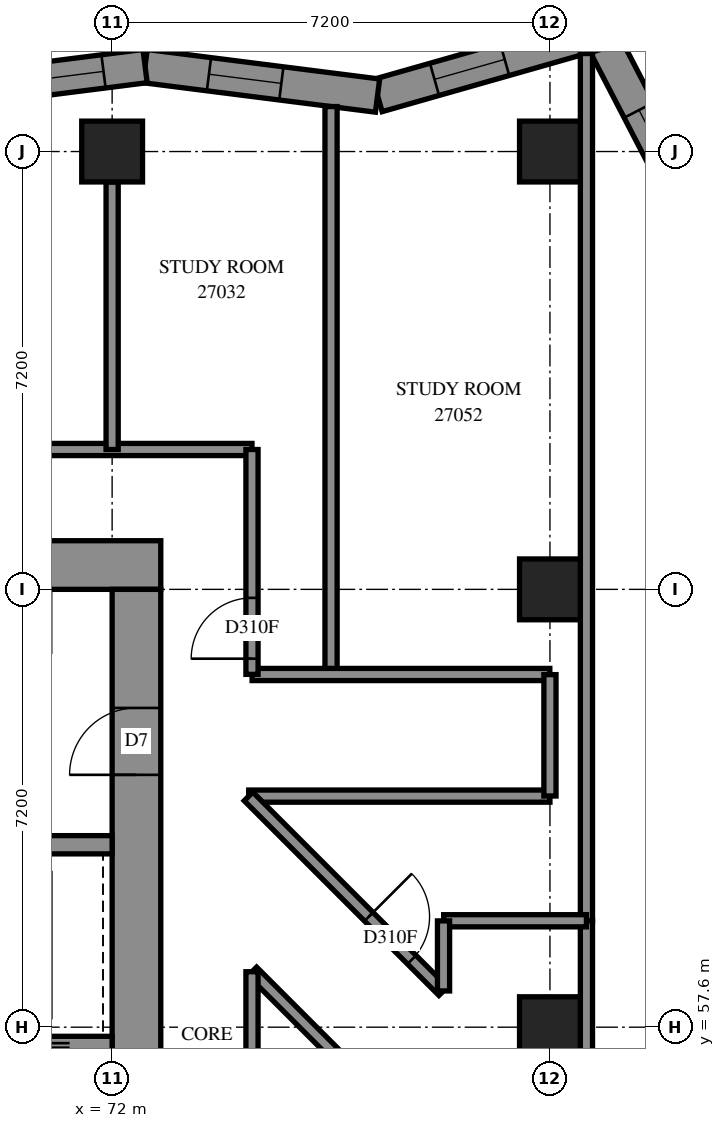
"""IFC4 building model, lengths in metres.
Left out: names, types, materials, properties, quantities, classifications, styles, units other than length and angle.
Written with IfcOpenShell. Run it as: python <this file> out.ifc"""

import sys

from ifc_helpers import new_model, si_unit, direction, frame, frame_2d, origin, origin_2d, place, context, subcontext, project, spatial, polyline, rectangle, outline, extrude, element, fill, save


model = new_model("IFC4")
c1 = context("Model", 3, precision=1e-05, world=origin(), true_north=direction((0.0, 1.0)))
c2 = subcontext(c1, "Body", "Model", "MODEL_VIEW")
j1 = project(units=[si_unit("LENGTHUNIT", "METRE"), si_unit("PLANEANGLEUNIT", "RADIAN")], contexts=[c1])
p1 = place(None, origin())
s1 = spatial("IfcSite", under=j1, at=p1, CompositionType="ELEMENT")
p2 = place(p1, origin())
s2 = spatial("IfcBuilding", under=s1, at=p2, CompositionType="ELEMENT")
p3 = place(p2, frame((0.0, 0.0, 101.6)))
s3 = spatial("IfcBuildingStorey", under=s2, at=p3, CompositionType="ELEMENT", Elevation=101.6)
for number, where, z_axis, x_axis in (
    (1, (72.0, 72.0, 0.0), (0.0, 0.0, 1.0), (1.0, 0.0, 0.0)),
    (2, (79.2, 57.6, 0.0), (0.0, 0.0, 1.0), (1.0, 0.0, 0.0)),
    (3, (79.2, 64.8, 0.0), (0.0, 0.0, 1.0), (1.0, 0.0, 0.0)),
    (4, (79.2, 72.0, 0.0), (0.0, 0.0, 1.0), (1.0, 0.0, 0.0)),
):
    element("IfcColumn", number, at=place(p3, frame(where, z_axis=z_axis, x_axis=x_axis)), inside=s3, PredefinedType="COLUMN", context=c2, shape_type="SweptSolid", body=[
        extrude(rectangle(XDim=1.0, YDim=1.0, at=origin_2d()), origin(), (0.0, 0.0, 1.0), 3.1),
    ])
p4 = place(p3, frame((56.8, 65.2, -0.3), z_axis=(0.0, 0.0, 1.0), x_axis=(1.0, 0.0, 0.0)))
e5 = element("IfcWall", 5, at=p4, inside=s3, PredefinedType="SHEAR", context=c2, shape_type="SweptSolid", body=[
    extrude(rectangle(XDim=16.0, YDim=0.8, at=frame_2d((8.0, 0.0))), origin(), (0.0, 0.0, 1.0), 2.7),
])
p5 = place(p4, frame((10.8, 0.0, 0.3)))
e6 = element("IfcOpeningElement", 6, at=p5, cuts=e5, PredefinedType="OPENING", context=c2, shape_type="SweptSolid", body=[
    extrude(rectangle(XDim=0.8, YDim=2.1, at=frame_2d((0.4, 1.05))), frame((0.0, 0.41, 0.0), z_axis=(0.0, -1.0, 0.0), x_axis=(1.0, 0.0, 0.0)), (0.0, 0.0, 1.0), 0.82),
])
p6 = place(p3, frame((72.4, 50.4, -0.3), z_axis=(0.0, 0.0, 1.0), x_axis=(0.0, 1.0, 0.0)))
e7 = element("IfcWall", 7, at=p6, inside=s3, PredefinedType="SHEAR", context=c2, shape_type="SweptSolid", body=[
    extrude(rectangle(XDim=14.4, YDim=0.8, at=frame_2d((7.2, 0.0))), origin(), (0.0, 0.0, 1.0), 2.7),
])
p7 = place(p6, frame((4.55, 0.0, 0.3)))
e8 = element("IfcOpeningElement", 8, at=p7, cuts=e7, PredefinedType="OPENING", context=c2, shape_type="SweptSolid", body=[
    extrude(rectangle(XDim=1.1, YDim=2.1, at=frame_2d((0.55, 1.05))), frame((0.0, 0.41, 0.0), z_axis=(0.0, -1.0, 0.0), x_axis=(1.0, 0.0, 0.0)), (0.0, 0.0, 1.0), 0.82),
])
p8 = place(p6, frame((11.35, 0.0, 0.3)))
e9 = element("IfcOpeningElement", 9, at=p8, cuts=e7, PredefinedType="OPENING", context=c2, shape_type="SweptSolid", body=[
    extrude(rectangle(XDim=1.1, YDim=2.1, at=frame_2d((0.55, 1.05))), frame((0.0, 0.41, 0.0), z_axis=(0.0, -1.0, 0.0), x_axis=(1.0, 0.0, 0.0)), (0.0, 0.0, 1.0), 0.82),
])
p9 = place(p3, frame((57.6, 57.3, 0.0), z_axis=(0.0, 0.0, 1.0), x_axis=(1.0, 0.0, 0.0)))
e10 = element("IfcWall", 10, at=p9, inside=s3, PredefinedType="SOLIDWALL", context=c2, shape_type="SweptSolid", body=[
    extrude(rectangle(XDim=14.4, YDim=0.3, at=frame_2d((7.2, 0.0))), origin(), (0.0, 0.0, 1.0), 3.1),
])
p10 = place(p9, frame((12.05, 0.0, 0.0)))
e11 = element("IfcOpeningElement", 11, at=p10, cuts=e10, PredefinedType="OPENING", context=c2, shape_type="SweptSolid", body=[
    extrude(rectangle(XDim=1.1, YDim=2.1, at=frame_2d((0.55, 1.05))), frame((0.0, 0.16, 0.0), z_axis=(0.0, -1.0, 0.0), x_axis=(1.0, 0.0, 0.0)), (0.0, 0.0, 1.0), 0.32),
])
p11 = place(p3, frame((64.8, 60.6, 0.0), z_axis=(0.0, 0.0, 1.0), x_axis=(1.0, 0.0, 0.0)))
e12 = element("IfcWall", 12, at=p11, inside=s3, PredefinedType="SOLIDWALL", context=c2, shape_type="SweptSolid", body=[
    extrude(rectangle(XDim=7.2, YDim=0.3, at=frame_2d((3.6, 0.0))), origin(), (0.0, 0.0, 1.0), 3.1),
])
p12 = place(p3, frame((76.372, 49.373, -0.3), z_axis=(0.0, 0.0, 1.0), x_axis=(0.7071067812, 0.7071067812, 0.0)))
e13 = element("IfcWall", 13, at=p12, inside=s3, PredefinedType="SHEAR", context=c2, shape_type="SweptSolid", body=[
    extrude(rectangle(XDim=14.4, YDim=0.8, at=frame_2d((7.2, 0.0))), origin(), (0.0, 0.0, 1.0), 2.7),
])
p13 = place(p12, frame((4.55, 0.0, 0.3)))
e14 = element("IfcOpeningElement", 14, at=p13, cuts=e13, PredefinedType="OPENING", context=c2, shape_type="SweptSolid", body=[
    extrude(rectangle(XDim=1.1, YDim=2.1, at=frame_2d((0.55, 1.05))), frame((0.0, 0.41, 0.0), z_axis=(0.0, -1.0, 0.0), x_axis=(1.0, 0.0, 0.0)), (0.0, 0.0, 1.0), 0.82),
])
p14 = place(p12, frame((11.35, 0.0, 0.3)))
e15 = element("IfcOpeningElement", 15, at=p14, cuts=e13, PredefinedType="OPENING", context=c2, shape_type="SweptSolid", body=[
    extrude(rectangle(XDim=1.1, YDim=2.1, at=frame_2d((0.55, 1.05))), frame((0.0, 0.41, 0.0), z_axis=(0.0, -1.0, 0.0), x_axis=(1.0, 0.0, 0.0)), (0.0, 0.0, 1.0), 0.82),
])
p15 = place(p3, frame((81.576, 70.923, 0.0), z_axis=(0.0, 0.0, 1.0), x_axis=(-0.4601530869, 0.8878395895, 0.0)))
e16 = element("IfcWall", 16, at=p15, inside=s3, PredefinedType="SOLIDWALL", context=c2, shape_type="SweptSolid", body=[
    extrude(outline(polyline([(0.063, -0.275), (3.64, -0.275), (3.191, 0.275), (-0.063, 0.275), (0.063, -0.275)])), origin(), (0.0, 0.0, 1.0), 3.1),
])
p16 = place(p15, frame((0.781, 0.0, 0.5)))
e17 = element("IfcOpeningElement", 17, at=p16, cuts=e16, PredefinedType="OPENING", context=c2, shape_type="SweptSolid", body=[
    extrude(rectangle(XDim=1.2, YDim=2.45, at=frame_2d((0.6, 1.225))), frame((0.0, 0.285, 0.0), z_axis=(0.0, -1.0, 0.0), x_axis=(1.0, 0.0, 0.0)), (0.0, 0.0, 1.0), 0.57),
])
p17 = place(p3, frame((80.004, 73.956, 0.0), z_axis=(0.0, 0.0, 1.0), x_axis=(-0.961803656, -0.2737402553, 0.0)))
e18 = element("IfcWall", 18, at=p17, inside=s3, PredefinedType="SOLIDWALL", context=c2, shape_type="SweptSolid", body=[
    extrude(outline(polyline([(-0.225, -0.275), (3.728, -0.275), (3.841, 0.275), (0.225, 0.275), (-0.225, -0.275)])), origin(), (0.0, 0.0, 1.0), 3.1),
])
p18 = place(p17, frame((1.61, 0.0, 0.5)))
e19 = element("IfcOpeningElement", 19, at=p18, cuts=e18, PredefinedType="OPENING", context=c2, shape_type="SweptSolid", body=[
    extrude(rectangle(XDim=1.2, YDim=2.45, at=frame_2d((0.6, 1.225))), frame((0.0, 0.285, 0.0), z_axis=(0.0, -1.0, 0.0), x_axis=(1.0, 0.0, 0.0)), (0.0, 0.0, 1.0), 0.57),
])
p19 = place(p3, frame((76.365, 72.92, 0.0), z_axis=(0.0, 0.0, 1.0), x_axis=(-0.9920579561, 0.1257816033, 0.0)))
e20 = element("IfcWall", 20, at=p19, inside=s3, PredefinedType="SOLIDWALL", context=c2, shape_type="SweptSolid", body=[
    extrude(outline(polyline([(0.056, -0.275), (3.888, -0.275), (3.819, 0.275), (-0.056, 0.275), (0.056, -0.275)])), origin(), (0.0, 0.0, 1.0), 3.1),
])
p20 = place(p19, frame((1.595, 0.0, 0.5)))
e21 = element("IfcOpeningElement", 21, at=p20, cuts=e20, PredefinedType="OPENING", context=c2, shape_type="SweptSolid", body=[
    extrude(rectangle(XDim=1.2, YDim=2.45, at=frame_2d((0.6, 1.225))), frame((0.0, 0.285, 0.0), z_axis=(0.0, -1.0, 0.0), x_axis=(1.0, 0.0, 0.0)), (0.0, 0.0, 1.0), 0.57),
])
p21 = place(p3, frame((72.542, 73.405, 0.0), z_axis=(0.0, 0.0, 1.0), x_axis=(-0.9920583495, -0.1257785003, 0.0)))
e22 = element("IfcWall", 22, at=p21, inside=s3, PredefinedType="SOLIDWALL", context=c2, shape_type="SweptSolid", body=[
    extrude(outline(polyline([(-0.035, -0.275), (3.797, -0.275), (3.867, 0.275), (0.035, 0.275), (-0.035, -0.275)])), origin(), (0.0, 0.0, 1.0), 3.1),
])
p22 = place(p21, frame((0.689, 0.0, 0.5)))
e23 = element("IfcOpeningElement", 23, at=p22, cuts=e22, PredefinedType="OPENING", context=c2, shape_type="SweptSolid", body=[
    extrude(rectangle(XDim=1.3, YDim=2.45, at=frame_2d((0.65, 1.225))), frame((0.0, 0.285, 0.0), z_axis=(0.0, -1.0, 0.0), x_axis=(1.0, 0.0, 0.0)), (0.0, 0.0, 1.0), 0.57),
])
p23 = place(p21, frame((2.189, 0.0, 0.5)))
e24 = element("IfcOpeningElement", 24, at=p23, cuts=e22, PredefinedType="OPENING", context=c2, shape_type="SweptSolid", body=[
    extrude(rectangle(XDim=1.3, YDim=2.45, at=frame_2d((0.65, 1.225))), frame((0.0, 0.285, 0.0), z_axis=(0.0, -1.0, 0.0), x_axis=(1.0, 0.0, 0.0)), (0.0, 0.0, 1.0), 0.57),
])
p24 = place(p3, frame((55.3, 67.1, 0.0), z_axis=(0.0, 0.0, 1.0), x_axis=(1.0, 0.0, 0.0)))
e25 = element("IfcWall", 25, at=p24, inside=s3, PredefinedType="PARTITIONING", context=c2, shape_type="SweptSolid", body=[
    extrude(rectangle(XDim=19.0, YDim=0.2, at=frame_2d((9.5, 0.0))), origin(), (0.0, 0.0, 1.0), 3.1),
])
p25 = place(p24, frame((6.199, 0.0, 0.0)))
e26 = element("IfcOpeningElement", 26, at=p25, cuts=e25, PredefinedType="OPENING", context=c2, shape_type="SweptSolid", body=[
    extrude(rectangle(XDim=0.9, YDim=2.1, at=frame_2d((0.45, 1.05))), frame((0.0, 0.11, 0.0), z_axis=(0.0, -1.0, 0.0), x_axis=(1.0, 0.0, 0.0)), (0.0, 0.0, 1.0), 0.22),
])
p26 = place(p24, frame((13.399, 0.0, 0.0)))
e27 = element("IfcOpeningElement", 27, at=p26, cuts=e25, PredefinedType="OPENING", context=c2, shape_type="SweptSolid", body=[
    extrude(rectangle(XDim=0.9, YDim=2.1, at=frame_2d((0.45, 1.05))), frame((0.0, 0.11, 0.0), z_axis=(0.0, -1.0, 0.0), x_axis=(1.0, 0.0, 0.0)), (0.0, 0.0, 1.0), 0.22),
])
p27 = place(p3, frame((79.8, 59.35, 0.0), z_axis=(0.0, 0.0, 1.0), x_axis=(0.0, 1.0, 0.0)))
e28 = element("IfcWall", 28, at=p27, inside=s3, PredefinedType="PARTITIONING", context=c2, shape_type="SweptSolid", body=[
    extrude(rectangle(XDim=14.262, YDim=0.2, at=frame_2d((7.131, 0.0))), origin(), (0.0, 0.0, 1.0), 3.1),
])
p28 = place(p3, frame((75.6, 63.4, 0.0), z_axis=(0.0, 0.0, 1.0), x_axis=(0.0, 1.0, 0.0)))
e29 = element("IfcWall", 29, at=p28, inside=s3, PredefinedType="PARTITIONING", context=c2, shape_type="SweptSolid", body=[
    extrude(rectangle(XDim=9.34, YDim=0.2, at=frame_2d((4.67, 0.0))), origin(), (0.0, 0.0, 1.0), 3.1),
])
p29 = place(p3, frame((74.246, 61.4, 0.0), z_axis=(0.0, 0.0, 1.0), x_axis=(1.0, 0.0, 0.0)))
e30 = element("IfcWall", 30, at=p29, inside=s3, PredefinedType="PARTITIONING", context=c2, shape_type="SweptSolid", body=[
    extrude(rectangle(XDim=4.954, YDim=0.2, at=frame_2d((2.477, 0.0))), origin(), (0.0, 0.0, 1.0), 3.1),
])
p30 = place(p3, frame((74.302, 63.4, 0.0), z_axis=(0.0, 0.0, 1.0), x_axis=(1.0, 0.0, 0.0)))
e31 = element("IfcWall", 31, at=p30, inside=s3, PredefinedType="PARTITIONING", context=c2, shape_type="SweptSolid", body=[
    extrude(rectangle(XDim=4.896, YDim=0.2, at=frame_2d((2.448, 0.0))), origin(), (0.0, 0.0, 1.0), 3.1),
])
p31 = place(p3, frame((74.243, 61.395, 0.0), z_axis=(0.0, 0.0, 1.0), x_axis=(0.7071067812, -0.7071067812, 0.0)))
e32 = element("IfcWall", 32, at=p31, inside=s3, PredefinedType="PARTITIONING", context=c2, shape_type="SweptSolid", body=[
    extrude(rectangle(XDim=4.528, YDim=0.2, at=frame_2d((2.264, 0.0))), origin(), (0.0, 0.0, 1.0), 3.1),
])
p32 = place(p31, frame((2.797, 0.0, 0.0)))
e33 = element("IfcOpeningElement", 33, at=p32, cuts=e32, PredefinedType="OPENING", context=c2, shape_type="SweptSolid", body=[
    extrude(rectangle(XDim=1.0, YDim=2.1, at=frame_2d((0.5, 1.05))), frame((0.0, 0.11, 0.0), z_axis=(0.0, -1.0, 0.0), x_axis=(1.0, 0.0, 0.0)), (0.0, 0.0, 1.0), 0.22),
])
p33 = place(p3, frame((72.0, 67.1, 0.0), z_axis=(0.0, 0.0, 1.0), x_axis=(0.0, 1.0, 0.0)))
e34 = element("IfcWall", 34, at=p33, inside=s3, PredefinedType="PARTITIONING", context=c2, shape_type="SweptSolid", body=[
    extrude(rectangle(XDim=4.4, YDim=0.2, at=frame_2d((2.2, 0.0))), origin(), (0.0, 0.0, 1.0), 3.1),
])
p34 = place(p3, frame((74.3, 63.402, 0.0), z_axis=(0.0, 0.0, 1.0), x_axis=(0.0, 1.0, 0.0)))
e35 = element("IfcWall", 35, at=p34, inside=s3, PredefinedType="PARTITIONING", context=c2, shape_type="SweptSolid", body=[
    extrude(rectangle(XDim=3.698, YDim=0.2, at=frame_2d((1.849, 0.0))), origin(), (0.0, 0.0, 1.0), 3.1),
])
p35 = place(p34, frame((0.258, 0.0, 0.0)))
e36 = element("IfcOpeningElement", 36, at=p35, cuts=e35, PredefinedType="OPENING", context=c2, shape_type="SweptSolid", body=[
    extrude(rectangle(XDim=1.0, YDim=2.1, at=frame_2d((0.5, 1.05))), frame((0.0, 0.11, 0.0), z_axis=(0.0, -1.0, 0.0), x_axis=(1.0, 0.0, 0.0)), (0.0, 0.0, 1.0), 0.22),
])
p36 = place(p3, frame((79.8, 55.85, 0.0), z_axis=(0.0, 0.0, 1.0), x_axis=(0.0, 1.0, 0.0)))
e37 = element("IfcWall", 37, at=p36, inside=s3, PredefinedType="PARTITIONING", context=c2, shape_type="SweptSolid", body=[
    extrude(rectangle(XDim=3.5, YDim=0.2, at=frame_2d((1.75, 0.0))), origin(), (0.0, 0.0, 1.0), 3.1),
])
p37 = place(p3, frame((74.305, 58.517, 0.0), z_axis=(0.0, 0.0, 1.0), x_axis=(0.7071067812, -0.7071067812, 0.0)))
e38 = element("IfcWall", 38, at=p37, inside=s3, PredefinedType="PARTITIONING", context=c2, shape_type="SweptSolid", body=[
    extrude(rectangle(XDim=3.27, YDim=0.2, at=frame_2d((1.635, 0.0))), origin(), (0.0, 0.0, 1.0), 3.1),
])
p38 = place(p3, frame((77.452, 59.35, 0.0), z_axis=(0.0, 0.0, 1.0), x_axis=(1.0, 0.0, 0.0)))
e39 = element("IfcWall", 39, at=p38, inside=s3, PredefinedType="PARTITIONING", context=c2, shape_type="SweptSolid", body=[
    extrude(rectangle(XDim=2.348, YDim=0.2, at=frame_2d((1.174, 0.0))), origin(), (0.0, 0.0, 1.0), 3.1),
])
p39 = place(p3, frame((74.3, 56.202, 0.0), z_axis=(0.0, 0.0, 1.0), x_axis=(0.0, 1.0, 0.0)))
e40 = element("IfcWall", 40, at=p39, inside=s3, PredefinedType="PARTITIONING", context=c2, shape_type="SweptSolid", body=[
    extrude(rectangle(XDim=2.31, YDim=0.2, at=frame_2d((1.155, 0.0))), origin(), (0.0, 0.0, 1.0), 3.1),
])
p40 = place(p3, frame((79.2, 61.402, 0.0), z_axis=(0.0, 0.0, 1.0), x_axis=(0.0, 1.0, 0.0)))
e41 = element("IfcWall", 41, at=p40, inside=s3, PredefinedType="PARTITIONING", context=c2, shape_type="SweptSolid", body=[
    extrude(rectangle(XDim=1.996, YDim=0.2, at=frame_2d((0.998, 0.0))), origin(), (0.0, 0.0, 1.0), 3.1),
])
p41 = place(p3, frame((77.45, 58.196, 0.0), z_axis=(0.0, 0.0, 1.0), x_axis=(0.0, 1.0, 0.0)))
e42 = element("IfcWall", 42, at=p41, inside=s3, PredefinedType="PARTITIONING", context=c2, shape_type="SweptSolid", body=[
    extrude(rectangle(XDim=1.152, YDim=0.2, at=frame_2d((0.576, 0.0))), origin(), (0.0, 0.0, 1.0), 3.1),
])
p42 = place(p16, origin())
e43 = element("IfcWindow", 43, at=p42, inside=s3, PartitioningType="SINGLE_PANEL", PredefinedType="WINDOW", context=c2, shape_type="SweptSolid", body=[
    extrude(rectangle(XDim=1.2, YDim=2.45, at=frame_2d((0.6, 1.225))), frame((0.0, 0.155, 0.0), z_axis=(0.0, -1.0, 0.0), x_axis=(1.0, 0.0, 0.0)), (0.0, 0.0, 1.0), 0.06),
])
fill(e17, e43)
p43 = place(p18, origin())
e44 = element("IfcWindow", 44, at=p43, inside=s3, PartitioningType="SINGLE_PANEL", PredefinedType="WINDOW", context=c2, shape_type="SweptSolid", body=[
    extrude(rectangle(XDim=1.2, YDim=2.45, at=frame_2d((0.6, 1.225))), frame((0.0, 0.155, 0.0), z_axis=(0.0, -1.0, 0.0), x_axis=(1.0, 0.0, 0.0)), (0.0, 0.0, 1.0), 0.06),
])
fill(e19, e44)
p44 = place(p20, origin())
e45 = element("IfcWindow", 45, at=p44, inside=s3, PartitioningType="SINGLE_PANEL", PredefinedType="WINDOW", context=c2, shape_type="SweptSolid", body=[
    extrude(rectangle(XDim=1.2, YDim=2.45, at=frame_2d((0.6, 1.225))), frame((0.0, 0.155, 0.0), z_axis=(0.0, -1.0, 0.0), x_axis=(1.0, 0.0, 0.0)), (0.0, 0.0, 1.0), 0.06),
])
fill(e21, e45)
p45 = place(p22, origin())
e46 = element("IfcWindow", 46, at=p45, inside=s3, PartitioningType="SINGLE_PANEL", PredefinedType="WINDOW", context=c2, shape_type="SweptSolid", body=[
    extrude(rectangle(XDim=1.3, YDim=2.45, at=frame_2d((0.65, 1.225))), frame((0.0, 0.155, 0.0), z_axis=(0.0, -1.0, 0.0), x_axis=(1.0, 0.0, 0.0)), (0.0, 0.0, 1.0), 0.06),
])
fill(e23, e46)
p46 = place(p8, origin())
e47 = element("IfcDoor", 47, at=p46, inside=s3, OperationType="SINGLE_SWING_RIGHT", PredefinedType="DOOR", context=c2, shape_type="SweptSolid", body=[
    extrude(rectangle(XDim=1.1, YDim=2.1, at=frame_2d((0.55, 1.05))), frame((0.0, 0.025, 0.0), z_axis=(0.0, -1.0, 0.0), x_axis=(1.0, 0.0, 0.0)), (0.0, 0.0, 1.0), 0.05),
])
fill(e9, e47)
p47 = place(p35, origin())
e48 = element("IfcDoor", 48, at=p47, inside=s3, OperationType="SINGLE_SWING_RIGHT", PredefinedType="DOOR", context=c2, shape_type="SweptSolid", body=[
    extrude(rectangle(XDim=1.0, YDim=2.1, at=frame_2d((0.5, 1.05))), frame((0.0, 0.025, 0.0), z_axis=(0.0, -1.0, 0.0), x_axis=(1.0, 0.0, 0.0)), (0.0, 0.0, 1.0), 0.05),
])
fill(e36, e48)
p48 = place(p32, origin())
e49 = element("IfcDoor", 49, at=p48, inside=s3, OperationType="SINGLE_SWING_LEFT", PredefinedType="DOOR", context=c2, shape_type="SweptSolid", body=[
    extrude(rectangle(XDim=1.0, YDim=2.1, at=frame_2d((0.5, 1.05))), frame((0.0, 0.025, 0.0), z_axis=(0.0, -1.0, 0.0), x_axis=(1.0, 0.0, 0.0)), (0.0, 0.0, 1.0), 0.05),
])
fill(e33, e49)
save(model, sys.argv[1])
